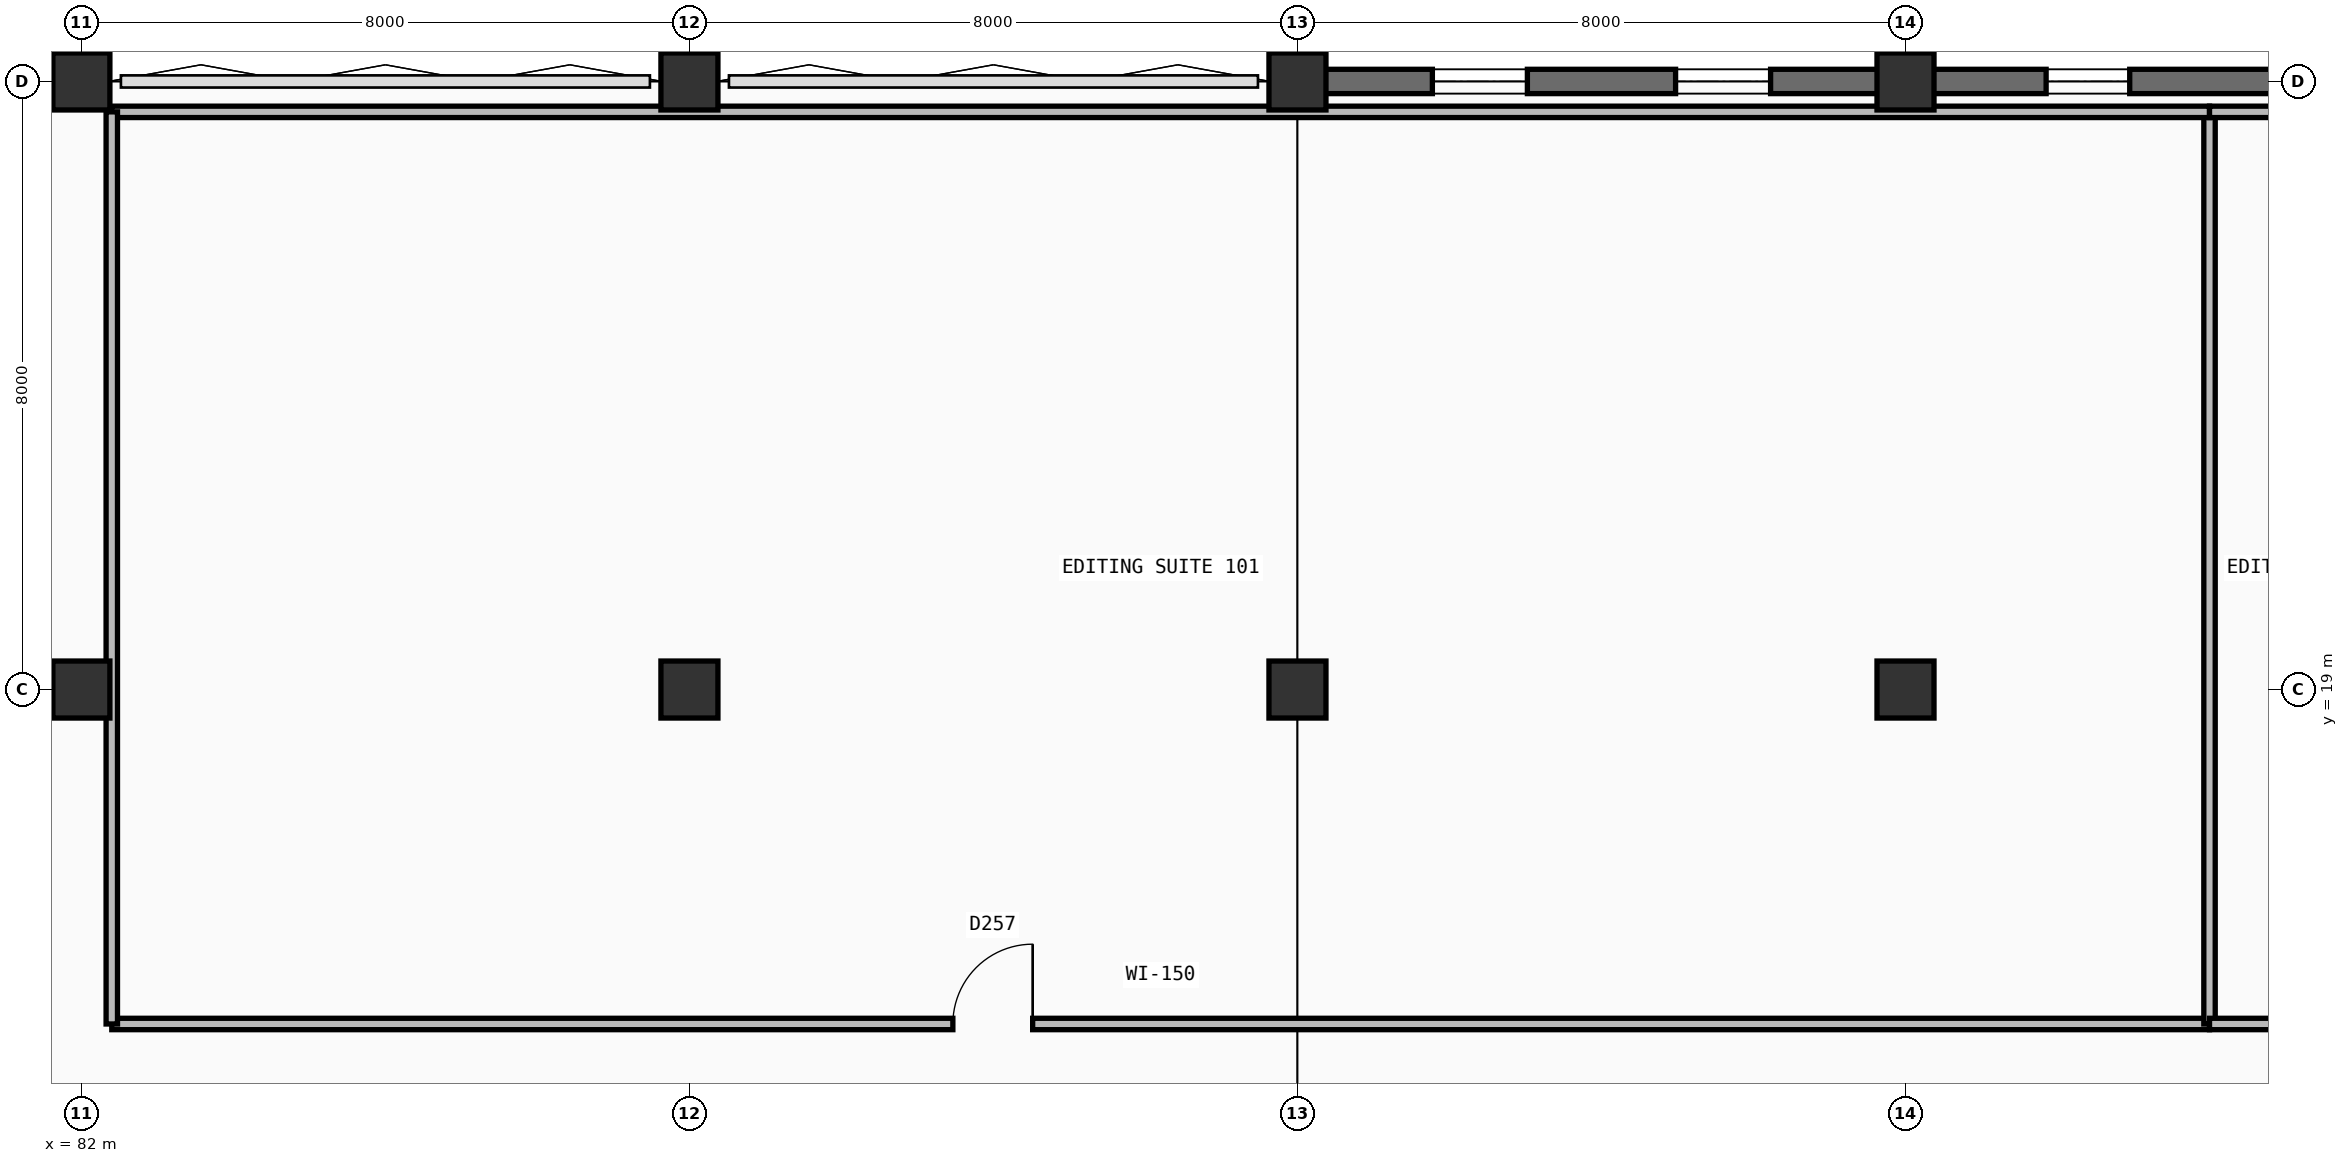
"""IFC4 building model, lengths in metres.
Left out: names, types, materials, properties, quantities, classifications, styles, units other than length and angle.
Written with IfcOpenShell. Run it as: python <this file> out.ifc"""

import sys

from ifc_helpers import new_model, si_unit, direction, frame, frame_2d, origin, origin_2d, place, context, subcontext, project, spatial, rectangle, extrude, element, fill, save


model = new_model("IFC4")
c1 = context("Model", 3, precision=1e-05, world=origin(), true_north=direction((0.0, 1.0)))
c2 = subcontext(c1, "Body", "Model", "MODEL_VIEW")
j1 = project(units=[si_unit("LENGTHUNIT", "METRE"), si_unit("PLANEANGLEUNIT", "RADIAN")], contexts=[c1])
p1 = place(None, origin())
s1 = spatial("IfcSite", under=j1, at=p1, CompositionType="ELEMENT")
p2 = place(p1, origin())
s2 = spatial("IfcBuilding", under=s1, at=p2, CompositionType="ELEMENT")
p3 = place(p2, frame((0.0, 0.0, 5.4)))
s3 = spatial("IfcBuildingStorey", under=s2, at=p3, CompositionType="ELEMENT", Elevation=5.4)
for number, where, z_axis, x_axis in (
    (1, (82.0, 19.0, 0.0), (0.0, 0.0, 1.0), (1.0, 0.0, 0.0)),
    (2, (82.0, 27.0, 0.0), (0.0, 0.0, 1.0), (1.0, 0.0, 0.0)),
    (3, (90.0, 19.0, 0.0), (0.0, 0.0, 1.0), (1.0, 0.0, 0.0)),
    (4, (90.0, 27.0, 0.0), (0.0, 0.0, 1.0), (1.0, 0.0, 0.0)),
    (5, (98.0, 19.0, 0.0), (0.0, 0.0, 1.0), (1.0, 0.0, 0.0)),
    (6, (98.0, 27.0, 0.0), (0.0, 0.0, 1.0), (1.0, 0.0, 0.0)),
    (7, (106.0, 19.0, 0.0), (0.0, 0.0, 1.0), (1.0, 0.0, 0.0)),
    (8, (106.0, 27.0, 0.0), (0.0, 0.0, 1.0), (1.0, 0.0, 0.0)),
):
    element("IfcColumn", number, at=place(p3, frame(where, z_axis=z_axis, x_axis=x_axis)), inside=s3, PredefinedType="COLUMN", context=c2, shape_type="SweptSolid", body=[
        extrude(rectangle(XDim=0.75, YDim=0.75, at=origin_2d()), origin(), (0.0, 0.0, 1.0), 4.5),
    ])
p4 = place(p3, frame((98.0, 27.0, 0.0), z_axis=(0.0, 0.0, 1.0), x_axis=(1.0, 0.0, 0.0)))
e9 = element("IfcWall", 9, at=p4, inside=s3, PredefinedType="SOLIDWALL", context=c2, shape_type="SweptSolid", body=[
    extrude(rectangle(XDim=8.0, YDim=0.32, at=frame_2d((4.0, 0.0))), origin(), (0.0, 0.0, 1.0), 4.5),
])
p5 = place(p4, frame((1.775, 0.0, 1.0)))
e10 = element("IfcOpeningElement", 10, at=p5, cuts=e9, PredefinedType="OPENING", context=c2, shape_type="SweptSolid", body=[
    extrude(rectangle(XDim=1.25, YDim=1.6, at=frame_2d((0.625, 0.8))), frame((0.0, 0.17, 0.0), z_axis=(0.0, -1.0, 0.0), x_axis=(1.0, 0.0, 0.0)), (0.0, 0.0, 1.0), 0.34),
])
p6 = place(p4, frame((4.975, 0.0, 1.0)))
e11 = element("IfcOpeningElement", 11, at=p6, cuts=e9, PredefinedType="OPENING", context=c2, shape_type="SweptSolid", body=[
    extrude(rectangle(XDim=1.25, YDim=1.6, at=frame_2d((0.625, 0.8))), frame((0.0, 0.17, 0.0), z_axis=(0.0, -1.0, 0.0), x_axis=(1.0, 0.0, 0.0)), (0.0, 0.0, 1.0), 0.34),
])
p7 = place(p3, frame((106.0, 27.0, 0.0), z_axis=(0.0, 0.0, 1.0), x_axis=(1.0, 0.0, 0.0)))
e12 = element("IfcWall", 12, at=p7, inside=s3, PredefinedType="SOLIDWALL", context=c2, shape_type="SweptSolid", body=[
    extrude(rectangle(XDim=8.0, YDim=0.32, at=frame_2d((4.0, 0.0))), origin(), (0.0, 0.0, 1.0), 4.5),
])
p8 = place(p7, frame((1.85, 0.0, 1.0)))
e13 = element("IfcOpeningElement", 13, at=p8, cuts=e12, PredefinedType="OPENING", context=c2, shape_type="SweptSolid", body=[
    extrude(rectangle(XDim=1.1, YDim=1.45, at=frame_2d((0.55, 0.725))), frame((0.0, 0.17, 0.0), z_axis=(0.0, -1.0, 0.0), x_axis=(1.0, 0.0, 0.0)), (0.0, 0.0, 1.0), 0.34),
])
p9 = place(p7, frame((5.05, 0.0, 1.0)))
e14 = element("IfcOpeningElement", 14, at=p9, cuts=e12, PredefinedType="OPENING", context=c2, shape_type="SweptSolid", body=[
    extrude(rectangle(XDim=1.1, YDim=1.45, at=frame_2d((0.55, 0.725))), frame((0.0, 0.17, 0.0), z_axis=(0.0, -1.0, 0.0), x_axis=(1.0, 0.0, 0.0)), (0.0, 0.0, 1.0), 0.34),
])
p10 = place(p3, frame((82.4, 14.6, 0.0), z_axis=(0.0, 0.0, 1.0), x_axis=(1.0, 0.0, 0.0)))
e15 = element("IfcWall", 15, at=p10, inside=s3, PredefinedType="PARTITIONING", context=c2, shape_type="SweptSolid", body=[
    extrude(rectangle(XDim=27.6, YDim=0.15, at=frame_2d((13.8, 0.0))), origin(), (0.0, 0.0, 1.0), 4.2),
])
p11 = place(p10, frame((11.066, 0.0, 0.0)))
e16 = element("IfcOpeningElement", 16, at=p11, cuts=e15, PredefinedType="OPENING", context=c2, shape_type="SweptSolid", body=[
    extrude(rectangle(XDim=1.05, YDim=2.15, at=frame_2d((0.525, 1.075))), frame((0.0, 0.085, 0.0), z_axis=(0.0, -1.0, 0.0), x_axis=(1.0, 0.0, 0.0)), (0.0, 0.0, 1.0), 0.17),
])
p12 = place(p3, frame((110.0, 14.6, 0.0), z_axis=(0.0, 0.0, 1.0), x_axis=(0.0, 1.0, 0.0)))
e17 = element("IfcWall", 17, at=p12, inside=s3, PredefinedType="PARTITIONING", context=c2, shape_type="SweptSolid", body=[
    extrude(rectangle(XDim=12.0, YDim=0.15, at=frame_2d((6.0, 0.0))), origin(), (0.0, 0.0, 1.0), 3.635),
])
p13 = place(p3, frame((82.4, 26.6, 0.0), z_axis=(0.0, 0.0, 1.0), x_axis=(1.0, 0.0, 0.0)))
e18 = element("IfcWall", 18, at=p13, inside=s3, PredefinedType="PARTITIONING", context=c2, shape_type="SweptSolid", body=[
    extrude(rectangle(XDim=27.6, YDim=0.15, at=frame_2d((13.8, 0.0))), origin(), (0.0, 0.0, 1.0), 3.505),
])
p14 = place(p3, frame((82.4, 14.6, 0.0), z_axis=(0.0, 0.0, 1.0), x_axis=(0.0, 1.0, 0.0)))
e19 = element("IfcWall", 19, at=p14, inside=s3, PredefinedType="PARTITIONING", context=c2, shape_type="SweptSolid", body=[
    extrude(rectangle(XDim=12.0, YDim=0.15, at=frame_2d((6.0, 0.0))), origin(), (0.0, 0.0, 1.0), 3.485),
])
p15 = place(p3, frame((110.0, 14.6, 0.0), z_axis=(0.0, 0.0, 1.0), x_axis=(1.0, 0.0, 0.0)))
e20 = element("IfcWall", 20, at=p15, inside=s3, PredefinedType="PARTITIONING", context=c2, shape_type="SweptSolid", body=[
    extrude(rectangle(XDim=27.6, YDim=0.15, at=frame_2d((13.8, 0.0))), origin(), (0.0, 0.0, 1.0), 4.2),
])
p16 = place(p15, frame((15.499, 0.0, 0.0)))
e21 = element("IfcOpeningElement", 21, at=p16, cuts=e20, PredefinedType="OPENING", context=c2, shape_type="SweptSolid", body=[
    extrude(rectangle(XDim=1.02, YDim=2.14, at=frame_2d((0.51, 1.07))), frame((0.0, 0.085, 0.0), z_axis=(0.0, -1.0, 0.0), x_axis=(1.0, 0.0, 0.0)), (0.0, 0.0, 1.0), 0.17),
])
p17 = place(p3, frame((110.0, 26.6, 0.0), z_axis=(0.0, 0.0, 1.0), x_axis=(1.0, 0.0, 0.0)))
e22 = element("IfcWall", 22, at=p17, inside=s3, PredefinedType="PARTITIONING", context=c2, shape_type="SweptSolid", body=[
    extrude(rectangle(XDim=27.6, YDim=0.15, at=frame_2d((13.8, 0.0))), origin(), (0.0, 0.0, 1.0), 3.505),
])
p18 = place(p5, origin())
e23 = element("IfcWindow", 23, at=p18, inside=s3, PartitioningType="SINGLE_PANEL", PredefinedType="WINDOW", context=c2, shape_type="SweptSolid", body=[
    extrude(rectangle(XDim=1.25, YDim=1.6, at=frame_2d((0.625, 0.8))), frame((0.0, 0.03, 0.0), z_axis=(0.0, -1.0, 0.0), x_axis=(1.0, 0.0, 0.0)), (0.0, 0.0, 1.0), 0.06),
])
fill(e10, e23)
p19 = place(p6, origin())
e24 = element("IfcWindow", 24, at=p19, inside=s3, PartitioningType="SINGLE_PANEL", PredefinedType="WINDOW", context=c2, shape_type="SweptSolid", body=[
    extrude(rectangle(XDim=1.25, YDim=1.6, at=frame_2d((0.625, 0.8))), frame((0.0, 0.03, 0.0), z_axis=(0.0, -1.0, 0.0), x_axis=(1.0, 0.0, 0.0)), (0.0, 0.0, 1.0), 0.06),
])
fill(e11, e24)
p20 = place(p8, origin())
e25 = element("IfcWindow", 25, at=p20, inside=s3, PartitioningType="SINGLE_PANEL", PredefinedType="WINDOW", context=c2, shape_type="SweptSolid", body=[
    extrude(rectangle(XDim=1.1, YDim=1.45, at=frame_2d((0.55, 0.725))), frame((0.0, 0.03, 0.0), z_axis=(0.0, -1.0, 0.0), x_axis=(1.0, 0.0, 0.0)), (0.0, 0.0, 1.0), 0.06),
])
fill(e13, e25)
p21 = place(p11, origin())
e26 = element("IfcDoor", 26, at=p21, inside=s3, OperationType="SINGLE_SWING_RIGHT", PredefinedType="DOOR", context=c2, shape_type="SweptSolid", body=[
    extrude(rectangle(XDim=1.05, YDim=2.15, at=frame_2d((0.525, 1.075))), frame((0.0, 0.025, 0.0), z_axis=(0.0, -1.0, 0.0), x_axis=(1.0, 0.0, 0.0)), (0.0, 0.0, 1.0), 0.05),
])
fill(e16, e26)
save(model, sys.argv[1])
